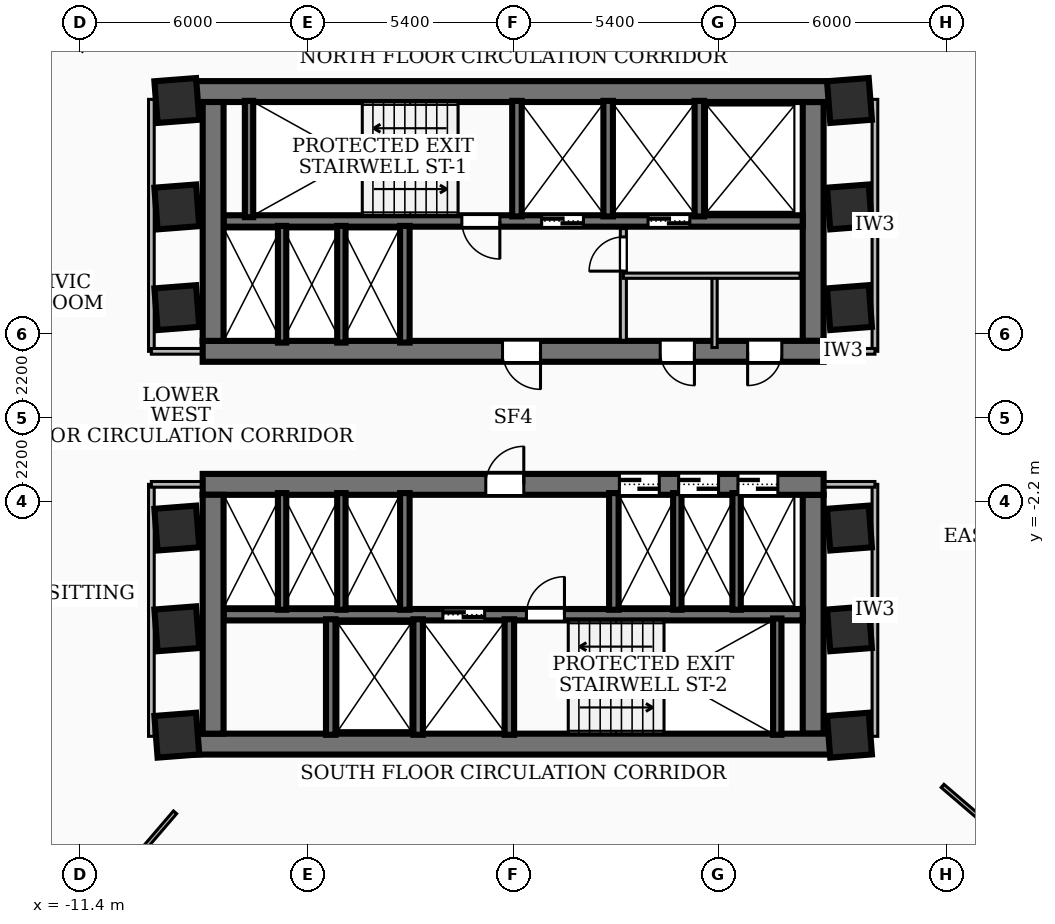
"""IFC4 building model, lengths in metres.
Left out: names, types, materials, properties, quantities, classifications, styles, units other than length and angle.
Written with IfcOpenShell. Run it as: python <this file> out.ifc"""

import sys

from ifc_helpers import new_model, si_unit, direction, frame, frame_2d, origin, origin_2d, place, context, subcontext, project, spatial, rectangle, extrude, element, fill, save


model = new_model("IFC4")
c1 = context("Model", 3, precision=1e-05, world=origin(), true_north=direction((0.0, 1.0)))
c2 = subcontext(c1, "Body", "Model", "MODEL_VIEW")
j1 = project(units=[si_unit("LENGTHUNIT", "METRE"), si_unit("PLANEANGLEUNIT", "RADIAN")], contexts=[c1])
p1 = place(None, origin())
s1 = spatial("IfcSite", under=j1, at=p1, CompositionType="ELEMENT")
p2 = place(p1, origin())
s2 = spatial("IfcBuilding", under=s1, at=p2, CompositionType="ELEMENT")
p3 = place(p2, frame((0.0, 0.0, 56.88)))
s3 = spatial("IfcBuildingStorey", under=s2, at=p3, CompositionType="ELEMENT", Elevation=56.88)
p4 = place(p3, frame((-8.78, 8.585, 0.0), z_axis=(0.0, 0.0, 1.0), x_axis=(1.0, 0.0, 0.0)))
e1 = element("IfcWall", 1, at=p4, inside=s3, PredefinedType="SHEAR", context=c2, shape_type="SweptSolid", body=[
    extrude(rectangle(XDim=17.56, YDim=0.55, at=frame_2d((8.78, 0.0))), origin(), (0.0, 0.0, 1.0), 3.32),
])
p5 = place(p3, frame((8.17, 1.75, 0.0), z_axis=(0.0, 0.0, 1.0), x_axis=(-1.0, 0.0, 0.0)))
e2 = element("IfcWall", 2, at=p5, inside=s3, PredefinedType="SHEAR", context=c2, shape_type="SweptSolid", body=[
    extrude(rectangle(XDim=16.34, YDim=0.55, at=frame_2d((8.17, 0.0))), origin(), (0.0, 0.0, 1.0), 3.32),
])
p6 = place(p5, frame((7.45, 0.0, 0.0)))
e3 = element("IfcOpeningElement", 3, at=p6, cuts=e2, PredefinedType="OPENING", context=c2, shape_type="SweptSolid", body=[
    extrude(rectangle(XDim=1.0, YDim=2.1, at=frame_2d((0.5, 1.05))), frame((0.0, 0.285, 0.0), z_axis=(0.0, -1.0, 0.0), x_axis=(1.0, 0.0, 0.0)), (0.0, 0.0, 1.0), 0.57),
])
p7 = place(p5, frame((3.4, 0.0, 0.0)))
e4 = element("IfcOpeningElement", 4, at=p7, cuts=e2, PredefinedType="OPENING", context=c2, shape_type="SweptSolid", body=[
    extrude(rectangle(XDim=0.9, YDim=2.06, at=frame_2d((0.45, 1.03))), frame((0.0, 0.285, 0.0), z_axis=(0.0, -1.0, 0.0), x_axis=(1.0, 0.0, 0.0)), (0.0, 0.0, 1.0), 0.57),
])
p8 = place(p5, frame((1.1, 0.0, 0.0)))
e5 = element("IfcOpeningElement", 5, at=p8, cuts=e2, PredefinedType="OPENING", context=c2, shape_type="SweptSolid", body=[
    extrude(rectangle(XDim=0.9, YDim=2.06, at=frame_2d((0.45, 1.03))), frame((0.0, 0.285, 0.0), z_axis=(0.0, -1.0, 0.0), x_axis=(1.0, 0.0, 0.0)), (0.0, 0.0, 1.0), 0.57),
])
for number, where, z_axis, x_axis in (
    (6, (-7.895, 2.025, 0.0), (0.0, 0.0, 1.0), (0.0, 1.0, 0.0)),
    (7, (7.895, 8.31, 0.0), (0.0, 0.0, 1.0), (0.0, -1.0, 0.0)),
):
    element("IfcWall", number, at=place(p3, frame(where, z_axis=z_axis, x_axis=x_axis)), inside=s3, PredefinedType="SHEAR", context=c2, shape_type="SweptSolid", body=[
        extrude(rectangle(XDim=6.285, YDim=0.55, at=frame_2d((3.143, 0.0))), origin(), (0.0, 0.0, 1.0), 3.32),
    ])
p9 = place(p3, frame((7.62, 5.18, 0.0), z_axis=(0.0, 0.0, 1.0), x_axis=(-1.0, 0.0, 0.0)))
e8 = element("IfcWall", 8, at=p9, inside=s3, PredefinedType="SOLIDWALL", context=c2, shape_type="SweptSolid", body=[
    extrude(rectangle(XDim=15.24, YDim=0.3, at=frame_2d((7.62, 0.0))), origin(), (0.0, 0.0, 1.0), 3.32),
])
p10 = place(p9, frame((5.77, 0.0, 0.0)))
e9 = element("IfcOpeningElement", 9, at=p10, cuts=e8, PredefinedType="OPENING", context=c2, shape_type="SweptSolid", body=[
    extrude(rectangle(XDim=1.1, YDim=2.15, at=frame_2d((0.55, 1.075))), frame((0.0, 0.16, 0.0), z_axis=(0.0, -1.0, 0.0), x_axis=(1.0, 0.0, 0.0)), (0.0, 0.0, 1.0), 0.32),
])
p11 = place(p9, frame((2.97, 0.0, 0.0)))
e10 = element("IfcOpeningElement", 10, at=p11, cuts=e8, PredefinedType="OPENING", context=c2, shape_type="SweptSolid", body=[
    extrude(rectangle(XDim=1.1, YDim=2.15, at=frame_2d((0.55, 1.075))), frame((0.0, 0.16, 0.0), z_axis=(0.0, -1.0, 0.0), x_axis=(1.0, 0.0, 0.0)), (0.0, 0.0, 1.0), 0.32),
])
p12 = place(p9, frame((7.97, 0.0, 0.0)))
e11 = element("IfcOpeningElement", 11, at=p12, cuts=e8, PredefinedType="OPENING", context=c2, shape_type="SweptSolid", body=[
    extrude(rectangle(XDim=1.0, YDim=2.1, at=frame_2d((0.5, 1.05))), frame((0.0, 0.16, 0.0), z_axis=(0.0, -1.0, 0.0), x_axis=(1.0, 0.0, 0.0)), (0.0, 0.0, 1.0), 0.32),
])
p13 = place(p3, frame((8.78, -8.585, 0.0), z_axis=(0.0, 0.0, 1.0), x_axis=(-1.0, 0.0, 0.0)))
e12 = element("IfcWall", 12, at=p13, inside=s3, PredefinedType="SHEAR", context=c2, shape_type="SweptSolid", body=[
    extrude(rectangle(XDim=17.56, YDim=0.55, at=frame_2d((8.78, 0.0))), origin(), (0.0, 0.0, 1.0), 3.32),
])
p14 = place(p3, frame((-8.17, -1.75, 0.0), z_axis=(0.0, 0.0, 1.0), x_axis=(1.0, 0.0, 0.0)))
e13 = element("IfcWall", 13, at=p14, inside=s3, PredefinedType="SHEAR", context=c2, shape_type="SweptSolid", body=[
    extrude(rectangle(XDim=16.34, YDim=0.55, at=frame_2d((8.17, 0.0))), origin(), (0.0, 0.0, 1.0), 3.32),
])
p15 = place(p14, frame((7.45, 0.0, 0.0)))
e14 = element("IfcOpeningElement", 14, at=p15, cuts=e13, PredefinedType="OPENING", context=c2, shape_type="SweptSolid", body=[
    extrude(rectangle(XDim=1.0, YDim=2.1, at=frame_2d((0.5, 1.05))), frame((0.0, 0.285, 0.0), z_axis=(0.0, -1.0, 0.0), x_axis=(1.0, 0.0, 0.0)), (0.0, 0.0, 1.0), 0.57),
])
p16 = place(p14, frame((10.965, 0.0, 0.0)))
e15 = element("IfcOpeningElement", 15, at=p16, cuts=e13, PredefinedType="OPENING", context=c2, shape_type="SweptSolid", body=[
    extrude(rectangle(XDim=1.05, YDim=2.15, at=frame_2d((0.525, 1.075))), frame((0.0, 0.285, 0.0), z_axis=(0.0, -1.0, 0.0), x_axis=(1.0, 0.0, 0.0)), (0.0, 0.0, 1.0), 0.57),
])
p17 = place(p14, frame((12.525, 0.0, 0.0)))
e16 = element("IfcOpeningElement", 16, at=p17, cuts=e13, PredefinedType="OPENING", context=c2, shape_type="SweptSolid", body=[
    extrude(rectangle(XDim=1.05, YDim=2.15, at=frame_2d((0.525, 1.075))), frame((0.0, 0.285, 0.0), z_axis=(0.0, -1.0, 0.0), x_axis=(1.0, 0.0, 0.0)), (0.0, 0.0, 1.0), 0.57),
])
p18 = place(p14, frame((14.085, 0.0, 0.0)))
e17 = element("IfcOpeningElement", 17, at=p18, cuts=e13, PredefinedType="OPENING", context=c2, shape_type="SweptSolid", body=[
    extrude(rectangle(XDim=1.05, YDim=2.15, at=frame_2d((0.525, 1.075))), frame((0.0, 0.285, 0.0), z_axis=(0.0, -1.0, 0.0), x_axis=(1.0, 0.0, 0.0)), (0.0, 0.0, 1.0), 0.57),
])
for number, where, z_axis, x_axis in (
    (18, (-7.895, -8.31, 0.0), (0.0, 0.0, 1.0), (0.0, 1.0, 0.0)),
    (19, (7.895, -2.025, 0.0), (0.0, 0.0, 1.0), (0.0, -1.0, 0.0)),
):
    element("IfcWall", number, at=place(p3, frame(where, z_axis=z_axis, x_axis=x_axis)), inside=s3, PredefinedType="SHEAR", context=c2, shape_type="SweptSolid", body=[
        extrude(rectangle(XDim=6.285, YDim=0.55, at=frame_2d((3.143, 0.0))), origin(), (0.0, 0.0, 1.0), 3.32),
    ])
p19 = place(p3, frame((-7.62, -5.18, 0.0), z_axis=(0.0, 0.0, 1.0), x_axis=(1.0, 0.0, 0.0)))
e20 = element("IfcWall", 20, at=p19, inside=s3, PredefinedType="SOLIDWALL", context=c2, shape_type="SweptSolid", body=[
    extrude(rectangle(XDim=15.24, YDim=0.3, at=frame_2d((7.62, 0.0))), origin(), (0.0, 0.0, 1.0), 3.32),
])
p20 = place(p19, frame((5.77, 0.0, 0.0)))
e21 = element("IfcOpeningElement", 21, at=p20, cuts=e20, PredefinedType="OPENING", context=c2, shape_type="SweptSolid", body=[
    extrude(rectangle(XDim=1.1, YDim=2.15, at=frame_2d((0.55, 1.075))), frame((0.0, 0.16, 0.0), z_axis=(0.0, -1.0, 0.0), x_axis=(1.0, 0.0, 0.0)), (0.0, 0.0, 1.0), 0.32),
])
p21 = place(p19, frame((7.97, 0.0, 0.0)))
e22 = element("IfcOpeningElement", 22, at=p21, cuts=e20, PredefinedType="OPENING", context=c2, shape_type="SweptSolid", body=[
    extrude(rectangle(XDim=1.0, YDim=2.1, at=frame_2d((0.5, 1.05))), frame((0.0, 0.16, 0.0), z_axis=(0.0, -1.0, 0.0), x_axis=(1.0, 0.0, 0.0)), (0.0, 0.0, 1.0), 0.32),
])
for number, where, z_axis, x_axis in (
    (23, (-6.95, 5.28, 0.0), (0.0, 0.0, 1.0), (0.0, 1.0, 0.0)),
    (24, (6.95, -8.34, 0.0), (0.0, 0.0, 1.0), (0.0, 1.0, 0.0)),
):
    element("IfcWall", number, at=place(p3, frame(where, z_axis=z_axis, x_axis=x_axis)), inside=s3, PredefinedType="SOLIDWALL", context=c2, shape_type="SweptSolid", body=[
        extrude(rectangle(XDim=3.06, YDim=0.22, at=frame_2d((1.53, 0.0))), origin(), (0.0, 0.0, 1.0), 3.32),
    ])
for number, where, z_axis, x_axis in (
    (25, (0.1, 5.3, 0.0), (0.0, 0.0, 1.0), (0.0, 1.0, 0.0)),
    (26, (2.5, 5.3, 0.0), (0.0, 0.0, 1.0), (0.0, 1.0, 0.0)),
    (27, (4.9, 5.3, 0.0), (0.0, 0.0, 1.0), (0.0, 1.0, 0.0)),
):
    element("IfcWall", number, at=place(p3, frame(where, z_axis=z_axis, x_axis=x_axis)), inside=s3, PredefinedType="SOLIDWALL", context=c2, shape_type="SweptSolid", body=[
        extrude(rectangle(XDim=3.04, YDim=0.25, at=frame_2d((1.52, 0.0))), origin(), (0.0, 0.0, 1.0), 3.32),
    ])
p22 = place(p3, frame((-2.85, 1.98, 0.0), z_axis=(0.0, 0.0, 1.0), x_axis=(0.0, 1.0, 0.0)))
e28 = element("IfcWall", 28, at=p22, inside=s3, PredefinedType="SOLIDWALL", context=c2, shape_type="SweptSolid", body=[
    extrude(rectangle(XDim=3.07, YDim=0.25, at=frame_2d((1.535, 0.0))), origin(), (0.0, 0.0, 1.0), 3.32),
])
for number, where, z_axis, x_axis in (
    (29, (-0.1, -8.34, 0.0), (0.0, 0.0, 1.0), (0.0, 1.0, 0.0)),
    (30, (-2.5, -8.34, 0.0), (0.0, 0.0, 1.0), (0.0, 1.0, 0.0)),
    (31, (-4.8, -8.34, 0.0), (0.0, 0.0, 1.0), (0.0, 1.0, 0.0)),
):
    element("IfcWall", number, at=place(p3, frame(where, z_axis=z_axis, x_axis=x_axis)), inside=s3, PredefinedType="SOLIDWALL", context=c2, shape_type="SweptSolid", body=[
        extrude(rectangle(XDim=3.04, YDim=0.25, at=frame_2d((1.52, 0.0))), origin(), (0.0, 0.0, 1.0), 3.32),
    ])
for number, where, z_axis, x_axis in (
    (32, (-2.85, -5.05, 0.0), (0.0, 0.0, 1.0), (0.0, 1.0, 0.0)),
    (33, (2.65, -5.05, 0.0), (0.0, 0.0, 1.0), (0.0, 1.0, 0.0)),
):
    element("IfcWall", number, at=place(p3, frame(where, z_axis=z_axis, x_axis=x_axis)), inside=s3, PredefinedType="SOLIDWALL", context=c2, shape_type="SweptSolid", body=[
        extrude(rectangle(XDim=3.07, YDim=0.25, at=frame_2d((1.535, 0.0))), origin(), (0.0, 0.0, 1.0), 3.32),
    ])
for number, where, z_axis, x_axis in (
    (34, (-6.08, 1.98, 0.0), (0.0, 0.0, 1.0), (0.0, 1.0, 0.0)),
    (35, (-4.52, 1.98, 0.0), (0.0, 0.0, 1.0), (0.0, 1.0, 0.0)),
    (36, (4.32, -5.05, 0.0), (0.0, 0.0, 1.0), (0.0, 1.0, 0.0)),
    (37, (5.88, -5.05, 0.0), (0.0, 0.0, 1.0), (0.0, 1.0, 0.0)),
    (38, (-6.08, -5.05, 0.0), (0.0, 0.0, 1.0), (0.0, 1.0, 0.0)),
    (39, (-4.52, -5.05, 0.0), (0.0, 0.0, 1.0), (0.0, 1.0, 0.0)),
):
    element("IfcWall", number, at=place(p3, frame(where, z_axis=z_axis, x_axis=x_axis)), inside=s3, PredefinedType="SOLIDWALL", context=c2, shape_type="SweptSolid", body=[
        extrude(rectangle(XDim=3.07, YDim=0.22, at=frame_2d((1.535, 0.0))), origin(), (0.0, 0.0, 1.0), 3.32),
    ])
for number, where, z_axis, x_axis in (
    (40, (-8.85, -5.55, 0.0), (0.0, 0.0, 1.0), (0.997, 0.077, 0.0)),
    (41, (-8.85, -2.9, 0.0), (0.0, 0.0, 1.0), (0.997, 0.077, 0.0)),
    (42, (-8.85, 2.9, 0.0), (0.0, 0.0, 1.0), (0.997, 0.077, 0.0)),
    (43, (-8.85, 5.55, 0.0), (0.0, 0.0, 1.0), (0.997, 0.077, 0.0)),
    (44, (8.85, -5.55, 0.0), (0.0, 0.0, 1.0), (0.997, 0.077, 0.0)),
    (45, (8.85, -2.9, 0.0), (0.0, 0.0, 1.0), (0.997, 0.077, 0.0)),
    (46, (8.85, 2.9, 0.0), (0.0, 0.0, 1.0), (0.997, 0.077, 0.0)),
    (47, (8.85, 5.55, 0.0), (0.0, 0.0, 1.0), (0.997, 0.077, 0.0)),
    (48, (-8.85, 8.35, 0.0), (0.0, 0.0, 1.0), (0.997, 0.077, 0.0)),
    (49, (8.85, -8.35, 0.0), (0.0, 0.0, 1.0), (0.997, 0.077, 0.0)),
    (50, (8.85, 8.35, 0.0), (0.0, 0.0, 1.0), (0.997, 0.077, 0.0)),
    (51, (-8.85, -8.35, 0.0), (0.0, 0.0, 1.0), (0.997, 0.077, 0.0)),
):
    element("IfcColumn", number, at=place(p3, frame(where, z_axis=z_axis, x_axis=x_axis)), inside=s3, PredefinedType="COLUMN", context=c2, shape_type="SweptSolid", body=[
        extrude(rectangle(XDim=1.1, YDim=1.1, at=origin_2d()), origin(), (0.0, 0.0, 1.0), 3.6),
    ])
p23 = place(p3, frame((2.9, 2.04, 0.0), z_axis=(0.0, 0.0, 1.0), x_axis=(0.0, 1.0, 0.0)))
e52 = element("IfcWall", 52, at=p23, inside=s3, PredefinedType="PARTITIONING", context=c2, shape_type="SweptSolid", body=[
    extrude(rectangle(XDim=2.94, YDim=0.16, at=frame_2d((1.47, 0.0))), origin(), (0.0, 0.0, 1.0), 2.385),
])
p24 = place(p23, frame((1.82, 0.0, 0.0)))
e53 = element("IfcOpeningElement", 53, at=p24, cuts=e52, PredefinedType="OPENING", context=c2, shape_type="SweptSolid", body=[
    extrude(rectangle(XDim=0.9, YDim=2.06, at=frame_2d((0.45, 1.03))), frame((0.0, 0.09, 0.0), z_axis=(0.0, -1.0, 0.0), x_axis=(1.0, 0.0, 0.0)), (0.0, 0.0, 1.0), 0.18),
])
p25 = place(p3, frame((2.9, 3.74, 0.0), z_axis=(0.0, 0.0, 1.0), x_axis=(1.0, 0.0, 0.0)))
e54 = element("IfcWall", 54, at=p25, inside=s3, PredefinedType="PARTITIONING", context=c2, shape_type="SweptSolid", body=[
    extrude(rectangle(XDim=4.65, YDim=0.138, at=frame_2d((2.325, 0.0))), origin(), (0.0, 0.0, 1.0), 3.32),
])
p26 = place(p3, frame((5.3, 1.85, 0.0), z_axis=(0.0, 0.0, 1.0), x_axis=(0.0, 1.0, 0.0)))
e55 = element("IfcWall", 55, at=p26, inside=s3, PredefinedType="PARTITIONING", context=c2, shape_type="SweptSolid", body=[
    extrude(rectangle(XDim=1.89, YDim=0.138, at=frame_2d((0.945, 0.0))), origin(), (0.0, 0.0, 1.0), 2.385),
])
p27 = place(p3, frame((-9.52, 1.75, 0.0), z_axis=(0.0, 0.0, 1.0), x_axis=(0.0, 1.0, 0.0)))
e56 = element("IfcWall", 56, at=p27, inside=s3, PredefinedType="PARTITIONING", context=c2, shape_type="SweptSolid", body=[
    extrude(rectangle(XDim=6.63, YDim=0.15, at=frame_2d((3.315, 0.0))), origin(), (0.0, 0.0, 1.0), 2.401),
])
p28 = place(p3, frame((-7.85, 1.75, 0.0), z_axis=(0.0, 0.0, 1.0), x_axis=(-1.0, 0.0, 0.0)))
e57 = element("IfcWall", 57, at=p28, inside=s3, PredefinedType="PARTITIONING", context=c2, shape_type="SweptSolid", body=[
    extrude(rectangle(XDim=1.67, YDim=0.15, at=frame_2d((0.835, 0.0))), origin(), (0.0, 0.0, 1.0), 2.385),
])
p29 = place(p3, frame((-9.52, -8.38, 0.0), z_axis=(0.0, 0.0, 1.0), x_axis=(0.0, 1.0, 0.0)))
e58 = element("IfcWall", 58, at=p29, inside=s3, PredefinedType="PARTITIONING", context=c2, shape_type="SweptSolid", body=[
    extrude(rectangle(XDim=6.63, YDim=0.15, at=frame_2d((3.315, 0.0))), origin(), (0.0, 0.0, 1.0), 2.401),
])
p30 = place(p3, frame((-7.85, -1.75, 0.0), z_axis=(0.0, 0.0, 1.0), x_axis=(-1.0, 0.0, 0.0)))
e59 = element("IfcWall", 59, at=p30, inside=s3, PredefinedType="PARTITIONING", context=c2, shape_type="SweptSolid", body=[
    extrude(rectangle(XDim=1.67, YDim=0.15, at=frame_2d((0.835, 0.0))), origin(), (0.0, 0.0, 1.0), 2.385),
])
p31 = place(p3, frame((9.52, 1.75, 0.0), z_axis=(0.0, 0.0, 1.0), x_axis=(0.0, 1.0, 0.0)))
e60 = element("IfcWall", 60, at=p31, inside=s3, PredefinedType="PARTITIONING", context=c2, shape_type="SweptSolid", body=[
    extrude(rectangle(XDim=6.63, YDim=0.15, at=frame_2d((3.315, 0.0))), origin(), (0.0, 0.0, 1.0), 2.401),
])
p32 = place(p3, frame((7.85, 1.75, 0.0), z_axis=(0.0, 0.0, 1.0), x_axis=(1.0, 0.0, 0.0)))
e61 = element("IfcWall", 61, at=p32, inside=s3, PredefinedType="PARTITIONING", context=c2, shape_type="SweptSolid", body=[
    extrude(rectangle(XDim=1.67, YDim=0.15, at=frame_2d((0.835, 0.0))), origin(), (0.0, 0.0, 1.0), 2.385),
])
p33 = place(p3, frame((9.52, -8.38, 0.0), z_axis=(0.0, 0.0, 1.0), x_axis=(0.0, 1.0, 0.0)))
e62 = element("IfcWall", 62, at=p33, inside=s3, PredefinedType="PARTITIONING", context=c2, shape_type="SweptSolid", body=[
    extrude(rectangle(XDim=6.63, YDim=0.15, at=frame_2d((3.315, 0.0))), origin(), (0.0, 0.0, 1.0), 2.401),
])
p34 = place(p3, frame((7.85, -1.75, 0.0), z_axis=(0.0, 0.0, 1.0), x_axis=(1.0, 0.0, 0.0)))
e63 = element("IfcWall", 63, at=p34, inside=s3, PredefinedType="PARTITIONING", context=c2, shape_type="SweptSolid", body=[
    extrude(rectangle(XDim=1.67, YDim=0.15, at=frame_2d((0.835, 0.0))), origin(), (0.0, 0.0, 1.0), 2.385),
])
p35 = place(p3, frame((-8.897, -10.38, 0.0), z_axis=(0.0, 0.0, 1.0), x_axis=(-0.650777932984, -0.759268122564, 0.0)))
e64 = element("IfcWall", 64, at=p35, inside=s3, PredefinedType="PARTITIONING", context=c2, shape_type="SweptSolid", body=[
    extrude(rectangle(XDim=5.984, YDim=0.11, at=frame_2d((2.992, 0.0))), origin(), (0.0, 0.0, 1.0), 3.32),
])
p36 = place(p3, frame((11.3, -9.685, 0.0), z_axis=(0.0, 0.0, 1.0), x_axis=(0.759206042513, -0.650850355313, 0.0)))
e65 = element("IfcWall", 65, at=p36, inside=s3, PredefinedType="PARTITIONING", context=c2, shape_type="SweptSolid", body=[
    extrude(rectangle(XDim=4.772, YDim=0.11, at=frame_2d((2.386, 0.0))), origin(), (0.0, 0.0, 1.0), 3.32),
])
p37 = place(p6, origin())
e66 = element("IfcDoor", 66, at=p37, inside=s3, OperationType="SINGLE_SWING_LEFT", PredefinedType="DOOR", context=c2, shape_type="SweptSolid", body=[
    extrude(rectangle(XDim=1.0, YDim=2.1, at=frame_2d((0.5, 1.05))), frame((0.0, 0.025, 0.0), z_axis=(0.0, -1.0, 0.0), x_axis=(1.0, 0.0, 0.0)), (0.0, 0.0, 1.0), 0.05),
])
fill(e3, e66)
p38 = place(p15, origin())
e67 = element("IfcDoor", 67, at=p38, inside=s3, OperationType="SINGLE_SWING_RIGHT", PredefinedType="DOOR", context=c2, shape_type="SweptSolid", body=[
    extrude(rectangle(XDim=1.0, YDim=2.1, at=frame_2d((0.5, 1.05))), frame((0.0, 0.025, 0.0), z_axis=(0.0, -1.0, 0.0), x_axis=(1.0, 0.0, 0.0)), (0.0, 0.0, 1.0), 0.05),
])
fill(e14, e67)
p39 = place(p10, origin())
e68 = element("IfcDoor", 68, at=p39, inside=s3, OperationType="DOUBLE_DOOR_SLIDING", PredefinedType="DOOR", context=c2, shape_type="SweptSolid", body=[
    extrude(rectangle(XDim=1.1, YDim=2.15, at=frame_2d((0.55, 1.075))), frame((0.0, 0.025, 0.0), z_axis=(0.0, -1.0, 0.0), x_axis=(1.0, 0.0, 0.0)), (0.0, 0.0, 1.0), 0.05),
])
fill(e9, e68)
p40 = place(p11, origin())
e69 = element("IfcDoor", 69, at=p40, inside=s3, OperationType="DOUBLE_DOOR_SLIDING", PredefinedType="DOOR", context=c2, shape_type="SweptSolid", body=[
    extrude(rectangle(XDim=1.1, YDim=2.15, at=frame_2d((0.55, 1.075))), frame((0.0, 0.025, 0.0), z_axis=(0.0, -1.0, 0.0), x_axis=(1.0, 0.0, 0.0)), (0.0, 0.0, 1.0), 0.05),
])
fill(e10, e69)
p41 = place(p12, origin())
e70 = element("IfcDoor", 70, at=p41, inside=s3, OperationType="SINGLE_SWING_LEFT", PredefinedType="DOOR", context=c2, shape_type="SweptSolid", body=[
    extrude(rectangle(XDim=1.0, YDim=2.1, at=frame_2d((0.5, 1.05))), frame((0.0, 0.025, 0.0), z_axis=(0.0, -1.0, 0.0), x_axis=(1.0, 0.0, 0.0)), (0.0, 0.0, 1.0), 0.05),
])
fill(e11, e70)
p42 = place(p20, origin())
e71 = element("IfcDoor", 71, at=p42, inside=s3, OperationType="DOUBLE_DOOR_SLIDING", PredefinedType="DOOR", context=c2, shape_type="SweptSolid", body=[
    extrude(rectangle(XDim=1.1, YDim=2.15, at=frame_2d((0.55, 1.075))), frame((0.0, 0.025, 0.0), z_axis=(0.0, -1.0, 0.0), x_axis=(1.0, 0.0, 0.0)), (0.0, 0.0, 1.0), 0.05),
])
fill(e21, e71)
p43 = place(p21, origin())
e72 = element("IfcDoor", 72, at=p43, inside=s3, OperationType="SINGLE_SWING_RIGHT", PredefinedType="DOOR", context=c2, shape_type="SweptSolid", body=[
    extrude(rectangle(XDim=1.0, YDim=2.1, at=frame_2d((0.5, 1.05))), frame((0.0, 0.025, 0.0), z_axis=(0.0, -1.0, 0.0), x_axis=(1.0, 0.0, 0.0)), (0.0, 0.0, 1.0), 0.05),
])
fill(e22, e72)
p44 = place(p16, origin())
e73 = element("IfcDoor", 73, at=p44, inside=s3, OperationType="DOUBLE_DOOR_SLIDING", PredefinedType="DOOR", context=c2, shape_type="SweptSolid", body=[
    extrude(rectangle(XDim=1.05, YDim=2.15, at=frame_2d((0.525, 1.075))), frame((0.0, 0.025, 0.0), z_axis=(0.0, -1.0, 0.0), x_axis=(1.0, 0.0, 0.0)), (0.0, 0.0, 1.0), 0.05),
])
fill(e15, e73)
p45 = place(p17, origin())
e74 = element("IfcDoor", 74, at=p45, inside=s3, OperationType="DOUBLE_DOOR_SLIDING", PredefinedType="DOOR", context=c2, shape_type="SweptSolid", body=[
    extrude(rectangle(XDim=1.05, YDim=2.15, at=frame_2d((0.525, 1.075))), frame((0.0, 0.025, 0.0), z_axis=(0.0, -1.0, 0.0), x_axis=(1.0, 0.0, 0.0)), (0.0, 0.0, 1.0), 0.05),
])
fill(e16, e74)
p46 = place(p18, origin())
e75 = element("IfcDoor", 75, at=p46, inside=s3, OperationType="DOUBLE_DOOR_SLIDING", PredefinedType="DOOR", context=c2, shape_type="SweptSolid", body=[
    extrude(rectangle(XDim=1.05, YDim=2.15, at=frame_2d((0.525, 1.075))), frame((0.0, 0.025, 0.0), z_axis=(0.0, -1.0, 0.0), x_axis=(1.0, 0.0, 0.0)), (0.0, 0.0, 1.0), 0.05),
])
fill(e17, e75)
p47 = place(p7, origin())
e76 = element("IfcDoor", 76, at=p47, inside=s3, OperationType="SINGLE_SWING_LEFT", PredefinedType="DOOR", context=c2, shape_type="SweptSolid", body=[
    extrude(rectangle(XDim=0.9, YDim=2.06, at=frame_2d((0.45, 1.03))), frame((0.0, 0.025, 0.0), z_axis=(0.0, -1.0, 0.0), x_axis=(1.0, 0.0, 0.0)), (0.0, 0.0, 1.0), 0.05),
])
fill(e4, e76)
p48 = place(p8, origin())
e77 = element("IfcDoor", 77, at=p48, inside=s3, OperationType="SINGLE_SWING_RIGHT", PredefinedType="DOOR", context=c2, shape_type="SweptSolid", body=[
    extrude(rectangle(XDim=0.9, YDim=2.06, at=frame_2d((0.45, 1.03))), frame((0.0, 0.025, 0.0), z_axis=(0.0, -1.0, 0.0), x_axis=(1.0, 0.0, 0.0)), (0.0, 0.0, 1.0), 0.05),
])
fill(e5, e77)
p49 = place(p24, origin())
e78 = element("IfcDoor", 78, at=p49, inside=s3, OperationType="SINGLE_SWING_LEFT", PredefinedType="DOOR", context=c2, shape_type="SweptSolid", body=[
    extrude(rectangle(XDim=0.9, YDim=2.06, at=frame_2d((0.45, 1.03))), frame((0.0, 0.025, 0.0), z_axis=(0.0, -1.0, 0.0), x_axis=(1.0, 0.0, 0.0)), (0.0, 0.0, 1.0), 0.05),
])
fill(e53, e78)
save(model, sys.argv[1])
